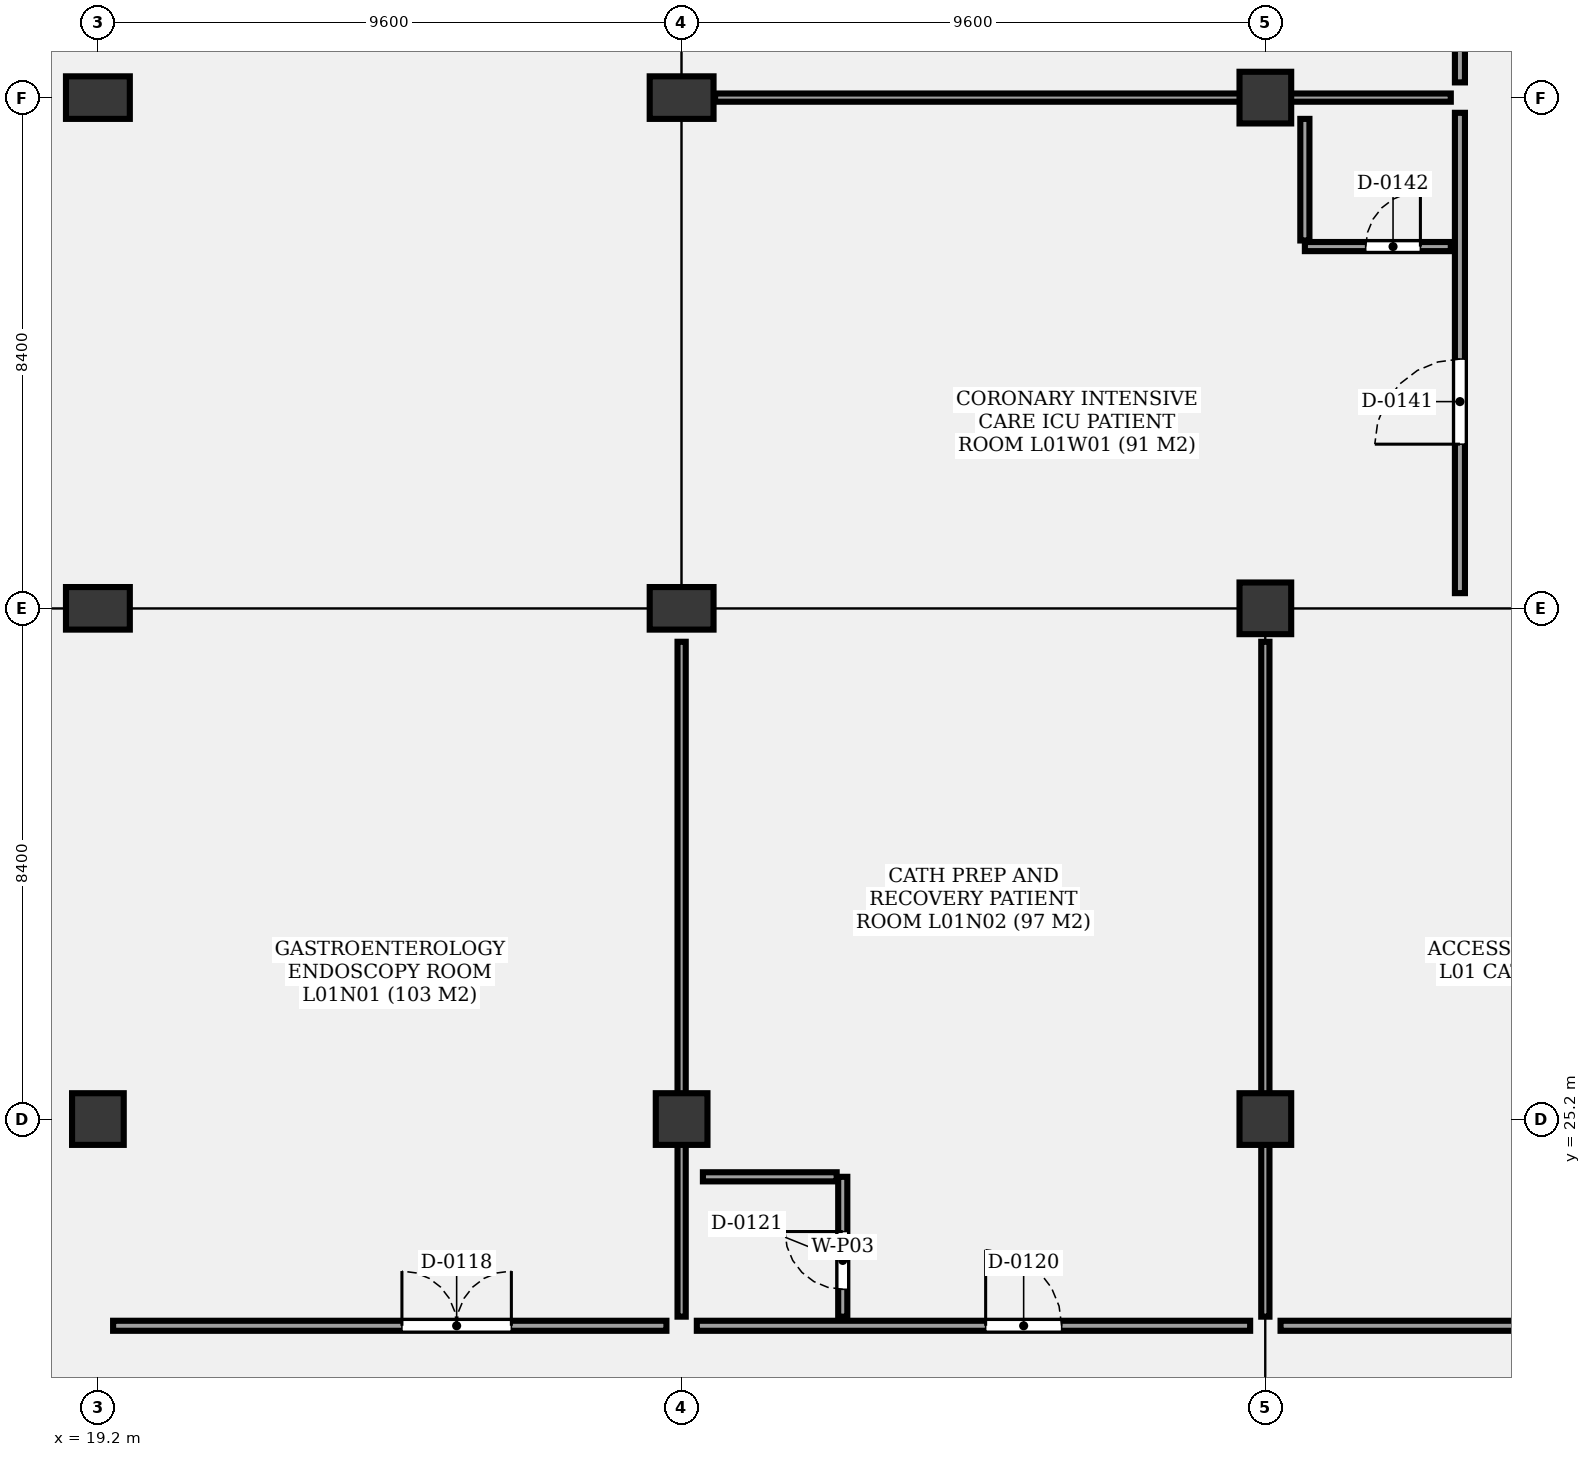
"""IFC4 building model, lengths in metres.
Left out: names, types, materials, properties, quantities, classifications, styles, units other than length and angle.
Written with IfcOpenShell. Run it as: python <this file> out.ifc"""

import sys

from ifc_helpers import new_model, si_unit, direction, frame, frame_2d, origin, origin_2d, place, context, subcontext, project, spatial, rectangle, extrude, element, fill, save


model = new_model("IFC4")
c1 = context("Model", 3, precision=1e-05, world=origin(), true_north=direction((0.0, 1.0)))
c2 = subcontext(c1, "Body", "Model", "MODEL_VIEW")
j1 = project(units=[si_unit("LENGTHUNIT", "METRE"), si_unit("PLANEANGLEUNIT", "RADIAN")], contexts=[c1])
p1 = place(None, origin())
s1 = spatial("IfcSite", under=j1, at=p1, CompositionType="ELEMENT")
p2 = place(p1, origin())
s2 = spatial("IfcBuilding", under=s1, at=p2, CompositionType="ELEMENT")
p3 = place(p2, frame((0.0, 0.0, 5.1)))
s3 = spatial("IfcBuildingStorey", under=s2, at=p3, CompositionType="ELEMENT", Elevation=5.1)
p4 = place(p3, frame((19.2, 25.2, 0.0), z_axis=(0.0, 0.0, 1.0), x_axis=(1.0, 0.0, 0.0)))
e1 = element("IfcColumn", 1, at=p4, inside=s3, PredefinedType="COLUMN", context=c2, shape_type="SweptSolid", body=[
    extrude(rectangle(XDim=0.85, YDim=0.85, at=origin_2d()), origin(), (0.0, 0.0, 1.0), 4.8),
])
for number, where, z_axis, x_axis in (
    (2, (19.2, 33.6, 0.0), (0.0, 0.0, 1.0), (1.0, 0.0, 0.0)),
    (3, (19.2, 42.0, 0.0), (0.0, 0.0, 1.0), (1.0, 0.0, 0.0)),
):
    element("IfcColumn", number, at=place(p3, frame(where, z_axis=z_axis, x_axis=x_axis)), inside=s3, PredefinedType="COLUMN", context=c2, shape_type="SweptSolid", body=[
        extrude(rectangle(XDim=1.05, YDim=0.7, at=origin_2d()), origin(), (0.0, 0.0, 1.0), 4.8),
    ])
p5 = place(p3, frame((28.8, 25.2, 0.0), z_axis=(0.0, 0.0, 1.0), x_axis=(1.0, 0.0, 0.0)))
e4 = element("IfcColumn", 4, at=p5, inside=s3, PredefinedType="COLUMN", context=c2, shape_type="SweptSolid", body=[
    extrude(rectangle(XDim=0.85, YDim=0.85, at=origin_2d()), origin(), (0.0, 0.0, 1.0), 4.8),
])
for number, where, z_axis, x_axis in (
    (5, (28.8, 33.6, 0.0), (0.0, 0.0, 1.0), (1.0, 0.0, 0.0)),
    (6, (28.8, 42.0, 0.0), (0.0, 0.0, 1.0), (1.0, 0.0, 0.0)),
):
    element("IfcColumn", number, at=place(p3, frame(where, z_axis=z_axis, x_axis=x_axis)), inside=s3, PredefinedType="COLUMN", context=c2, shape_type="SweptSolid", body=[
        extrude(rectangle(XDim=1.05, YDim=0.7, at=origin_2d()), origin(), (0.0, 0.0, 1.0), 4.8),
    ])
for number, where, z_axis, x_axis in (
    (7, (38.4, 25.2, 0.0), (0.0, 0.0, 1.0), (1.0, 0.0, 0.0)),
    (8, (38.4, 33.6, 0.0), (0.0, 0.0, 1.0), (1.0, 0.0, 0.0)),
    (9, (38.4, 42.0, 0.0), (0.0, 0.0, 1.0), (1.0, 0.0, 0.0)),
):
    element("IfcColumn", number, at=place(p3, frame(where, z_axis=z_axis, x_axis=x_axis)), inside=s3, PredefinedType="COLUMN", context=c2, shape_type="SweptSolid", body=[
        extrude(rectangle(XDim=0.85, YDim=0.85, at=origin_2d()), origin(), (0.0, 0.0, 1.0), 4.8),
    ])
p6 = place(p3, frame((19.45, 21.8, 0.0), z_axis=(0.0, 0.0, 1.0), x_axis=(1.0, 0.0, 0.0)))
e10 = element("IfcWall", 10, at=p6, inside=s3, PredefinedType="PARTITIONING", context=c2, shape_type="SweptSolid", body=[
    extrude(rectangle(XDim=9.1, YDim=0.165, at=frame_2d((4.55, 0.0))), origin(), (0.0, 0.0, 1.0), 3.68),
])
p7 = place(p6, frame((4.75, 0.0, 0.0)))
e11 = element("IfcOpeningElement", 11, at=p7, cuts=e10, PredefinedType="OPENING", context=c2, shape_type="SweptSolid", body=[
    extrude(rectangle(XDim=1.8, YDim=2.4, at=frame_2d((0.9, 1.2))), frame((0.0, 0.093, 0.0), z_axis=(0.0, -1.0, 0.0), x_axis=(1.0, 0.0, 0.0)), (0.0, 0.0, 1.0), 0.185),
])
p8 = place(p3, frame((29.05, 21.8, 0.0), z_axis=(0.0, 0.0, 1.0), x_axis=(1.0, 0.0, 0.0)))
e12 = element("IfcWall", 12, at=p8, inside=s3, PredefinedType="PARTITIONING", context=c2, shape_type="SweptSolid", body=[
    extrude(rectangle(XDim=9.1, YDim=0.165, at=frame_2d((4.55, 0.0))), origin(), (0.0, 0.0, 1.0), 3.68),
])
p9 = place(p8, frame((4.75, 0.0, 0.0)))
e13 = element("IfcOpeningElement", 13, at=p9, cuts=e12, PredefinedType="OPENING", context=c2, shape_type="SweptSolid", body=[
    extrude(rectangle(XDim=1.25, YDim=2.2, at=frame_2d((0.625, 1.1))), frame((0.0, 0.093, 0.0), z_axis=(0.0, -1.0, 0.0), x_axis=(1.0, 0.0, 0.0)), (0.0, 0.0, 1.0), 0.185),
])
p10 = place(p3, frame((31.45, 21.95, 0.0), z_axis=(0.0, 0.0, 1.0), x_axis=(0.0, 1.0, 0.0)))
e14 = element("IfcWall", 14, at=p10, inside=s3, PredefinedType="PARTITIONING", context=c2, shape_type="SweptSolid", body=[
    extrude(rectangle(XDim=2.3, YDim=0.15, at=frame_2d((1.15, 0.0))), origin(), (0.0, 0.0, 1.0), 3.68),
])
p11 = place(p10, frame((0.45, 0.0, 0.0)))
e15 = element("IfcOpeningElement", 15, at=p11, cuts=e14, PredefinedType="OPENING", context=c2, shape_type="SweptSolid", body=[
    extrude(rectangle(XDim=0.95, YDim=2.1, at=frame_2d((0.475, 1.05))), frame((0.0, 0.085, 0.0), z_axis=(0.0, -1.0, 0.0), x_axis=(1.0, 0.0, 0.0)), (0.0, 0.0, 1.0), 0.17),
])
p12 = place(p3, frame((29.15, 24.25, 0.0), z_axis=(0.0, 0.0, 1.0), x_axis=(1.0, 0.0, 0.0)))
e16 = element("IfcWall", 16, at=p12, inside=s3, PredefinedType="PARTITIONING", context=c2, shape_type="SweptSolid", body=[
    extrude(rectangle(XDim=2.2, YDim=0.15, at=frame_2d((1.1, 0.0))), origin(), (0.0, 0.0, 1.0), 3.68),
])
p13 = place(p3, frame((28.8, 21.95, 0.0), z_axis=(0.0, 0.0, 1.0), x_axis=(0.0, 1.0, 0.0)))
e17 = element("IfcWall", 17, at=p13, inside=s3, PredefinedType="PARTITIONING", context=c2, shape_type="SweptSolid", body=[
    extrude(rectangle(XDim=11.1, YDim=0.135, at=frame_2d((5.55, 0.0))), origin(), (0.0, 0.0, 1.0), 3.68),
])
p14 = place(p3, frame((38.65, 21.8, 0.0), z_axis=(0.0, 0.0, 1.0), x_axis=(1.0, 0.0, 0.0)))
e18 = element("IfcWall", 18, at=p14, inside=s3, PredefinedType="PARTITIONING", context=c2, shape_type="SweptSolid", body=[
    extrude(rectangle(XDim=9.1, YDim=0.165, at=frame_2d((4.55, 0.0))), origin(), (0.0, 0.0, 1.0), 3.68),
])
p15 = place(p14, frame((4.75, 0.0, 0.0)))
e19 = element("IfcOpeningElement", 19, at=p15, cuts=e18, PredefinedType="OPENING", context=c2, shape_type="SweptSolid", body=[
    extrude(rectangle(XDim=0.95, YDim=2.1, at=frame_2d((0.475, 1.05))), frame((0.0, 0.093, 0.0), z_axis=(0.0, -1.0, 0.0), x_axis=(1.0, 0.0, 0.0)), (0.0, 0.0, 1.0), 0.185),
])
p16 = place(p3, frame((38.4, 21.95, 0.0), z_axis=(0.0, 0.0, 1.0), x_axis=(0.0, 1.0, 0.0)))
e20 = element("IfcWall", 20, at=p16, inside=s3, PredefinedType="PARTITIONING", context=c2, shape_type="SweptSolid", body=[
    extrude(rectangle(XDim=11.1, YDim=0.135, at=frame_2d((5.55, 0.0))), origin(), (0.0, 0.0, 1.0), 3.68),
])
p17 = place(p3, frame((41.6, 33.85, 0.0), z_axis=(0.0, 0.0, 1.0), x_axis=(0.0, 1.0, 0.0)))
e21 = element("IfcWall", 21, at=p17, inside=s3, PredefinedType="PARTITIONING", context=c2, shape_type="SweptSolid", body=[
    extrude(rectangle(XDim=7.9, YDim=0.165, at=frame_2d((3.95, 0.0))), origin(), (0.0, 0.0, 1.0), 3.68),
])
p18 = place(p17, frame((2.45, 0.0, 0.0)))
e22 = element("IfcOpeningElement", 22, at=p18, cuts=e21, PredefinedType="OPENING", context=c2, shape_type="SweptSolid", body=[
    extrude(rectangle(XDim=1.4, YDim=2.4, at=frame_2d((0.7, 1.2))), frame((0.0, 0.093, 0.0), z_axis=(0.0, -1.0, 0.0), x_axis=(1.0, 0.0, 0.0)), (0.0, 0.0, 1.0), 0.185),
])
p19 = place(p3, frame((39.05, 39.55, 0.0), z_axis=(0.0, 0.0, 1.0), x_axis=(1.0, 0.0, 0.0)))
e23 = element("IfcWall", 23, at=p19, inside=s3, PredefinedType="PARTITIONING", context=c2, shape_type="SweptSolid", body=[
    extrude(rectangle(XDim=2.4, YDim=0.15, at=frame_2d((1.2, 0.0))), origin(), (0.0, 0.0, 1.0), 3.68),
])
p20 = place(p19, frame((1.0, 0.0, 0.0)))
e24 = element("IfcOpeningElement", 24, at=p20, cuts=e23, PredefinedType="OPENING", context=c2, shape_type="SweptSolid", body=[
    extrude(rectangle(XDim=0.9, YDim=2.1, at=frame_2d((0.45, 1.05))), frame((0.0, 0.085, 0.0), z_axis=(0.0, -1.0, 0.0), x_axis=(1.0, 0.0, 0.0)), (0.0, 0.0, 1.0), 0.17),
])
p21 = place(p3, frame((39.05, 39.65, 0.0), z_axis=(0.0, 0.0, 1.0), x_axis=(0.0, 1.0, 0.0)))
e25 = element("IfcWall", 25, at=p21, inside=s3, PredefinedType="PARTITIONING", context=c2, shape_type="SweptSolid", body=[
    extrude(rectangle(XDim=2.0, YDim=0.15, at=frame_2d((1.0, 0.0))), origin(), (0.0, 0.0, 1.0), 3.68),
])
p22 = place(p3, frame((41.6, 42.25, 0.0), z_axis=(0.0, 0.0, 1.0), x_axis=(0.0, 1.0, 0.0)))
e26 = element("IfcWall", 26, at=p22, inside=s3, PredefinedType="PARTITIONING", context=c2, shape_type="SweptSolid", body=[
    extrude(rectangle(XDim=7.9, YDim=0.165, at=frame_2d((3.95, 0.0))), origin(), (0.0, 0.0, 1.0), 3.68),
])
p23 = place(p22, frame((2.45, 0.0, 0.0)))
e27 = element("IfcOpeningElement", 27, at=p23, cuts=e26, PredefinedType="OPENING", context=c2, shape_type="SweptSolid", body=[
    extrude(rectangle(XDim=1.2, YDim=2.4, at=frame_2d((0.6, 1.2))), frame((0.0, 0.093, 0.0), z_axis=(0.0, -1.0, 0.0), x_axis=(1.0, 0.0, 0.0)), (0.0, 0.0, 1.0), 0.185),
])
p24 = place(p3, frame((29.35, 42.0, 0.0), z_axis=(0.0, 0.0, 1.0), x_axis=(1.0, 0.0, 0.0)))
e28 = element("IfcWall", 28, at=p24, inside=s3, PredefinedType="PARTITIONING", context=c2, shape_type="SweptSolid", body=[
    extrude(rectangle(XDim=12.1, YDim=0.135, at=frame_2d((6.05, 0.0))), origin(), (0.0, 0.0, 1.0), 3.68),
])
p25 = place(p7, origin())
e29 = element("IfcDoor", 29, at=p25, inside=s3, OperationType="DOUBLE_DOOR_SINGLE_SWING", PredefinedType="DOOR", context=c2, shape_type="SweptSolid", body=[
    extrude(rectangle(XDim=1.8, YDim=2.4, at=frame_2d((0.9, 1.2))), frame((0.0, 0.025, 0.0), z_axis=(0.0, -1.0, 0.0), x_axis=(1.0, 0.0, 0.0)), (0.0, 0.0, 1.0), 0.05),
])
fill(e11, e29)
p26 = place(p9, origin())
e30 = element("IfcDoor", 30, at=p26, inside=s3, OperationType="SINGLE_SWING_LEFT", PredefinedType="DOOR", context=c2, shape_type="SweptSolid", body=[
    extrude(rectangle(XDim=1.25, YDim=2.2, at=frame_2d((0.625, 1.1))), frame((0.0, 0.025, 0.0), z_axis=(0.0, -1.0, 0.0), x_axis=(1.0, 0.0, 0.0)), (0.0, 0.0, 1.0), 0.05),
])
fill(e13, e30)
p27 = place(p11, origin())
e31 = element("IfcDoor", 31, at=p27, inside=s3, OperationType="SINGLE_SWING_RIGHT", PredefinedType="DOOR", context=c2, shape_type="SweptSolid", body=[
    extrude(rectangle(XDim=0.95, YDim=2.1, at=frame_2d((0.475, 1.05))), frame((0.0, 0.025, 0.0), z_axis=(0.0, -1.0, 0.0), x_axis=(1.0, 0.0, 0.0)), (0.0, 0.0, 1.0), 0.05),
])
fill(e15, e31)
p28 = place(p18, origin())
e32 = element("IfcDoor", 32, at=p28, inside=s3, OperationType="SINGLE_SWING_LEFT", PredefinedType="DOOR", context=c2, shape_type="SweptSolid", body=[
    extrude(rectangle(XDim=1.4, YDim=2.4, at=frame_2d((0.7, 1.2))), frame((0.0, 0.025, 0.0), z_axis=(0.0, -1.0, 0.0), x_axis=(1.0, 0.0, 0.0)), (0.0, 0.0, 1.0), 0.05),
])
fill(e22, e32)
p29 = place(p20, origin())
e33 = element("IfcDoor", 33, at=p29, inside=s3, OperationType="SINGLE_SWING_RIGHT", PredefinedType="DOOR", context=c2, shape_type="SweptSolid", body=[
    extrude(rectangle(XDim=0.9, YDim=2.1, at=frame_2d((0.45, 1.05))), frame((0.0, 0.025, 0.0), z_axis=(0.0, -1.0, 0.0), x_axis=(1.0, 0.0, 0.0)), (0.0, 0.0, 1.0), 0.05),
])
fill(e24, e33)
save(model, sys.argv[1])
